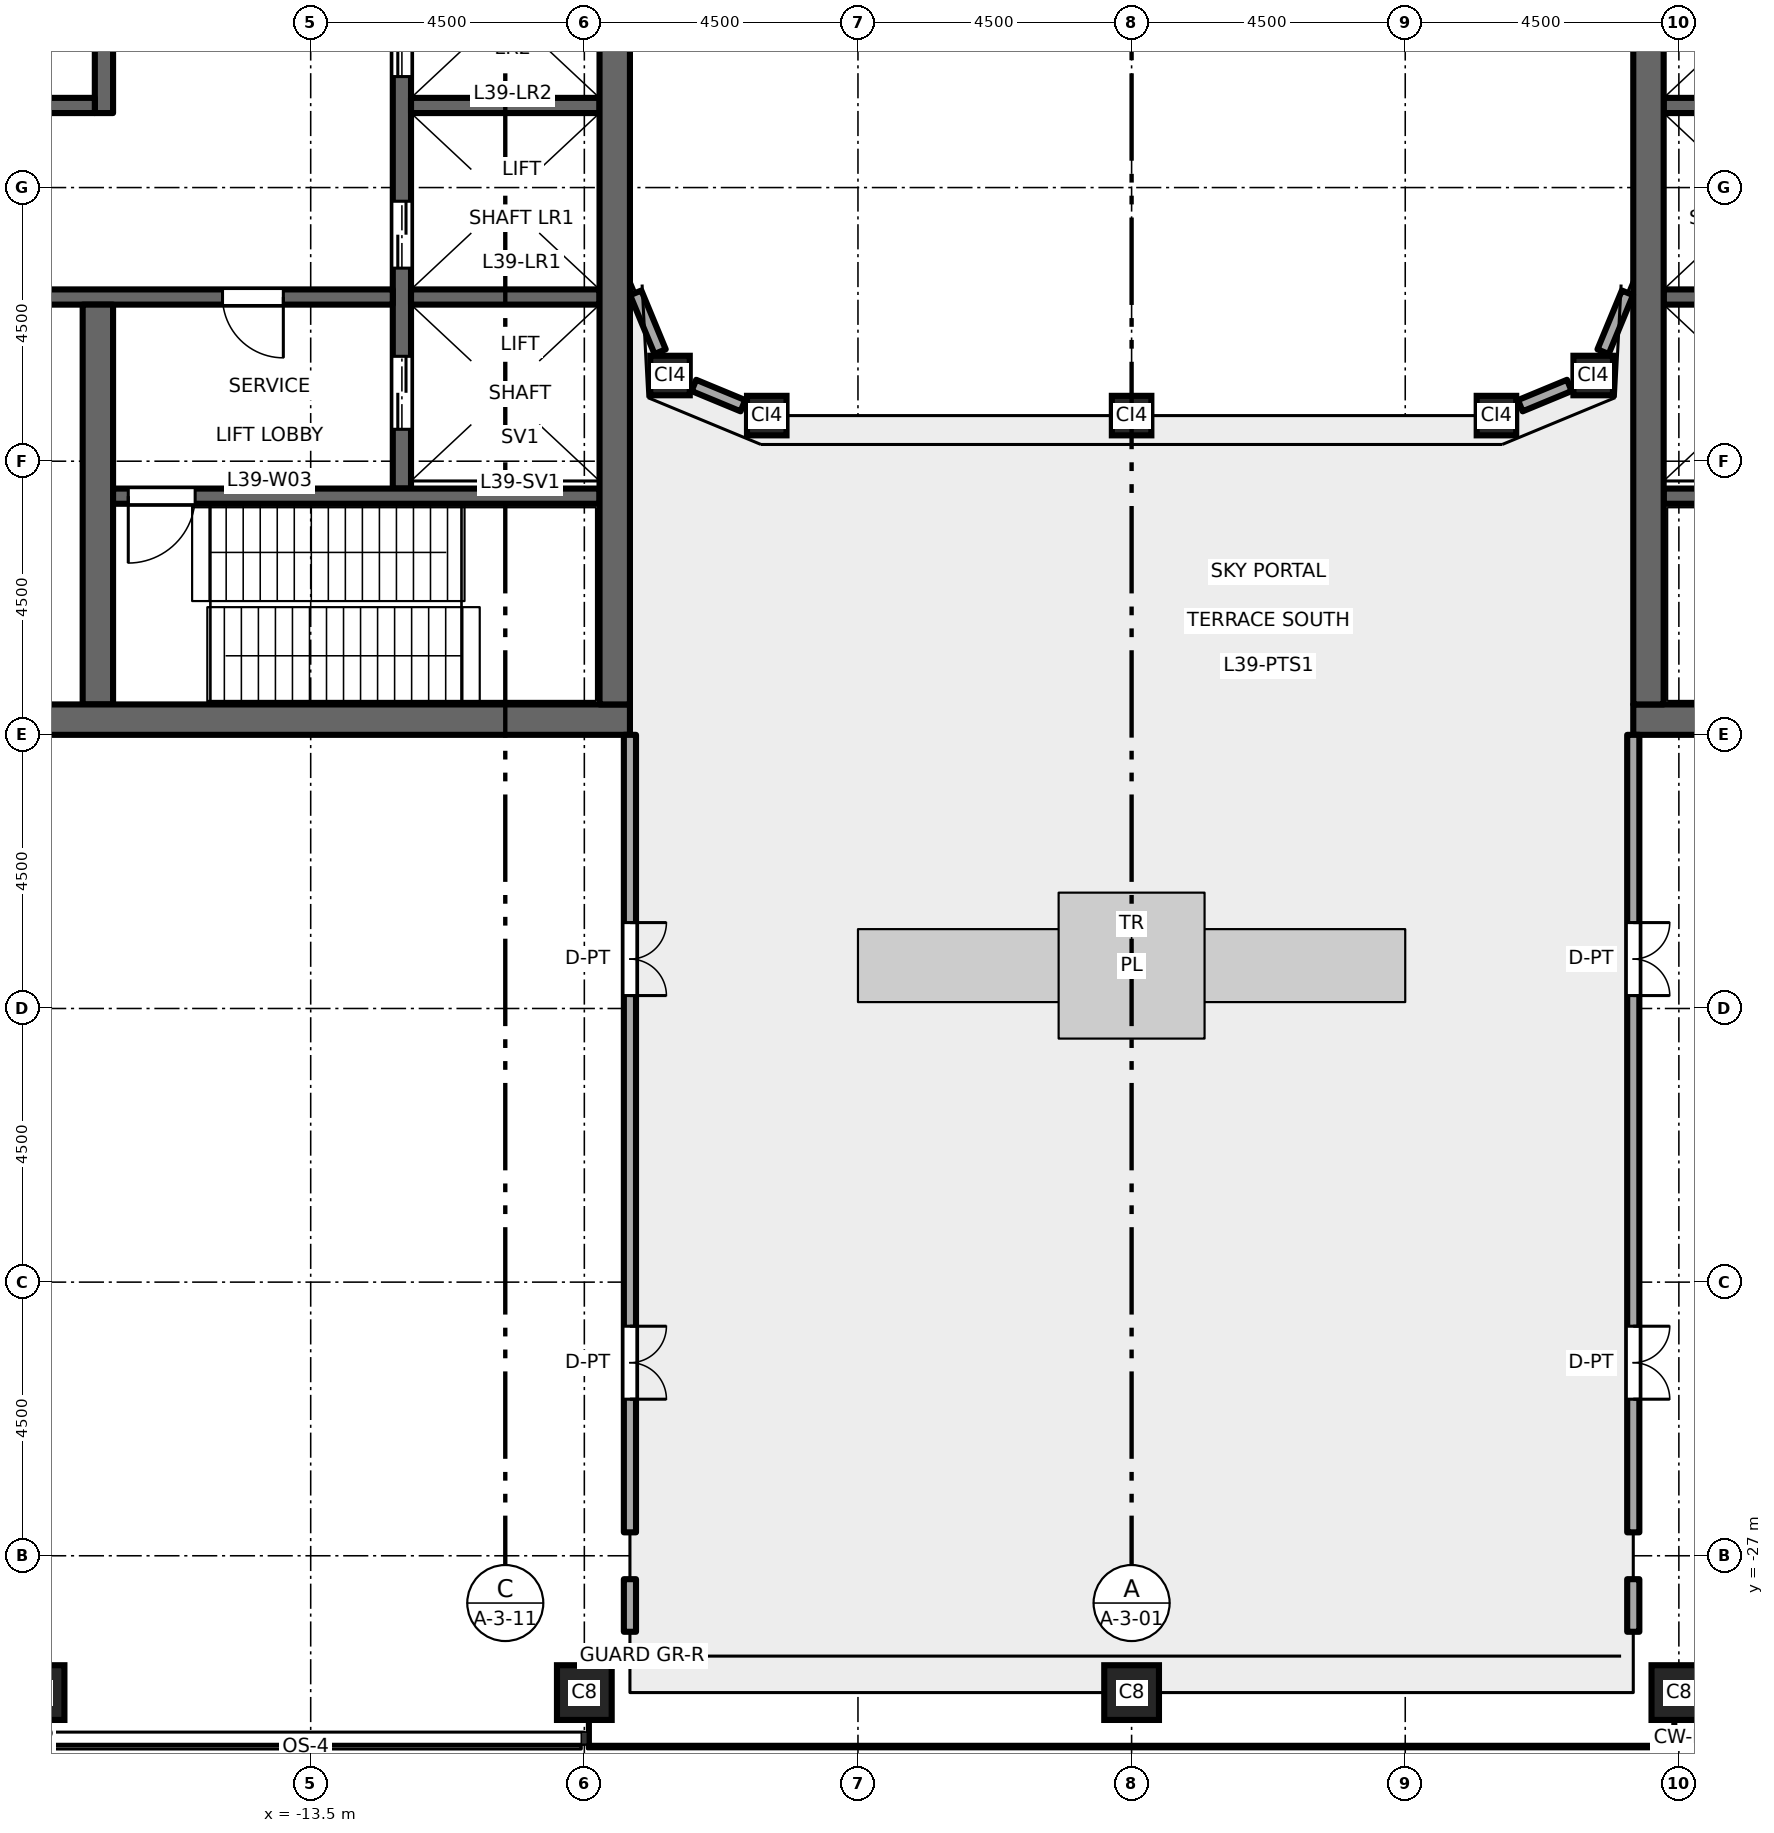
"""IFC4 building model, lengths in metres.
Left out: names, types, materials, properties, quantities, classifications, styles, units other than length and angle.
Written with IfcOpenShell. Run it as: python <this file> out.ifc"""

import sys

from ifc_helpers import new_model, si_unit, direction, frame, frame_2d, origin, origin_2d, place, context, subcontext, project, spatial, rectangle, hollow_rectangle, extrude, element, fill, save


model = new_model("IFC4")
c1 = context("Model", 3, precision=1e-05, world=origin(), true_north=direction((0.0, 1.0)))
c2 = subcontext(c1, "Body", "Model", "MODEL_VIEW")
j1 = project(units=[si_unit("LENGTHUNIT", "METRE"), si_unit("PLANEANGLEUNIT", "RADIAN")], contexts=[c1])
p1 = place(None, origin())
s1 = spatial("IfcSite", under=j1, at=p1, CompositionType="ELEMENT")
p2 = place(p1, origin())
s2 = spatial("IfcBuilding", under=s1, at=p2, CompositionType="ELEMENT")
p3 = place(p2, frame((0.0, 0.0, 181.2)))
s3 = spatial("IfcBuildingStorey", under=s2, at=p3, CompositionType="ELEMENT", Elevation=181.2)
for number, where, z_axis, x_axis in (
    (1, (-18.0, -29.25, 0.0), (0.0, 0.0, 1.0), (1.0, 0.0, 0.0)),
    (2, (-9.0, -29.25, 0.0), (0.0, 0.0, 1.0), (1.0, 0.0, 0.0)),
    (3, (0.0, -29.25, 0.0), (0.0, 0.0, 1.0), (1.0, 0.0, 0.0)),
    (4, (9.0, -29.25, 0.0), (0.0, 0.0, 1.0), (1.0, 0.0, 0.0)),
):
    element("IfcColumn", number, at=place(p3, frame(where, z_axis=z_axis, x_axis=x_axis)), inside=s3, PredefinedType="COLUMN", context=c2, shape_type="SweptSolid", body=[
        extrude(hollow_rectangle(XDim=0.9, YDim=0.9, WallThickness=0.05, at=origin_2d()), origin(), (0.0, 0.0, 1.0), 6.0),
    ])
for number, where, z_axis, x_axis in (
    (5, (-7.591, -7.591, 0.0), (0.0, 0.0, 1.0), (1.0, 0.0, 0.0)),
    (6, (-6.0, -8.25, 0.0), (0.0, 0.0, 1.0), (1.0, 0.0, 0.0)),
    (7, (0.0, -8.25, 0.0), (0.0, 0.0, 1.0), (1.0, 0.0, 0.0)),
    (8, (6.0, -8.25, 0.0), (0.0, 0.0, 1.0), (1.0, 0.0, 0.0)),
    (9, (7.591, -7.591, 0.0), (0.0, 0.0, 1.0), (1.0, 0.0, 0.0)),
):
    element("IfcColumn", number, at=place(p3, frame(where, z_axis=z_axis, x_axis=x_axis)), inside=s3, PredefinedType="COLUMN", context=c2, shape_type="SweptSolid", body=[
        extrude(hollow_rectangle(XDim=0.65, YDim=0.65, WallThickness=0.036, at=origin_2d()), origin(), (0.0, 0.0, 1.0), 6.0),
    ])
p4 = place(p3, frame((-12.0, -9.45, 0.0), z_axis=(0.0, 0.0, 1.0), x_axis=(0.0, 1.0, 0.0)))
e10 = element("IfcWall", 10, at=p4, inside=s3, PredefinedType="SHEAR", context=c2, shape_type="SweptSolid", body=[
    extrude(rectangle(XDim=18.9, YDim=0.3, at=frame_2d((9.45, 0.0))), origin(), (0.0, 0.0, 1.0), 5.8),
])
p5 = place(p4, frame((3.625, 0.0, 0.0)))
e11 = element("IfcOpeningElement", 11, at=p5, cuts=e10, PredefinedType="OPENING", context=c2, shape_type="SweptSolid", body=[
    extrude(rectangle(XDim=1.1, YDim=2.1, at=frame_2d((0.55, 1.05))), frame((0.0, 0.16, 0.0), z_axis=(0.0, -1.0, 0.0), x_axis=(1.0, 0.0, 0.0)), (0.0, 0.0, 1.0), 0.32),
])
p6 = place(p4, frame((6.775, 0.0, 0.0)))
e12 = element("IfcOpeningElement", 12, at=p6, cuts=e10, PredefinedType="OPENING", context=c2, shape_type="SweptSolid", body=[
    extrude(rectangle(XDim=1.1, YDim=2.1, at=frame_2d((0.55, 1.05))), frame((0.0, 0.16, 0.0), z_axis=(0.0, -1.0, 0.0), x_axis=(1.0, 0.0, 0.0)), (0.0, 0.0, 1.0), 0.32),
])
p7 = place(p4, frame((9.925, 0.0, 0.0)))
e13 = element("IfcOpeningElement", 13, at=p7, cuts=e10, PredefinedType="OPENING", context=c2, shape_type="SweptSolid", body=[
    extrude(rectangle(XDim=1.1, YDim=2.1, at=frame_2d((0.55, 1.05))), frame((0.0, 0.16, 0.0), z_axis=(0.0, -1.0, 0.0), x_axis=(1.0, 0.0, 0.0)), (0.0, 0.0, 1.0), 0.32),
])
p8 = place(p4, frame((13.075, 0.0, 0.0)))
e14 = element("IfcOpeningElement", 14, at=p8, cuts=e10, PredefinedType="OPENING", context=c2, shape_type="SweptSolid", body=[
    extrude(rectangle(XDim=1.1, YDim=2.1, at=frame_2d((0.55, 1.05))), frame((0.0, 0.16, 0.0), z_axis=(0.0, -1.0, 0.0), x_axis=(1.0, 0.0, 0.0)), (0.0, 0.0, 1.0), 0.32),
])
p9 = place(p4, frame((16.725, 0.0, 0.0)))
e15 = element("IfcOpeningElement", 15, at=p9, cuts=e10, PredefinedType="OPENING", context=c2, shape_type="SweptSolid", body=[
    extrude(rectangle(XDim=1.2, YDim=2.1, at=frame_2d((0.6, 1.05))), frame((0.0, 0.16, 0.0), z_axis=(0.0, -1.0, 0.0), x_axis=(1.0, 0.0, 0.0)), (0.0, 0.0, 1.0), 0.32),
])
p10 = place(p4, frame((0.975, 0.0, 0.0)))
e16 = element("IfcOpeningElement", 16, at=p10, cuts=e10, PredefinedType="OPENING", context=c2, shape_type="SweptSolid", body=[
    extrude(rectangle(XDim=1.2, YDim=2.1, at=frame_2d((0.6, 1.05))), frame((0.0, 0.16, 0.0), z_axis=(0.0, -1.0, 0.0), x_axis=(1.0, 0.0, 0.0)), (0.0, 0.0, 1.0), 0.32),
])
p11 = place(p3, frame((-12.15, -6.3, 0.0), z_axis=(0.0, 0.0, 1.0), x_axis=(-1.0, 0.0, 0.0)))
e17 = element("IfcWall", 17, at=p11, inside=s3, PredefinedType="SHEAR", context=c2, shape_type="SweptSolid", body=[
    extrude(rectangle(XDim=9.1, YDim=0.25, at=frame_2d((4.55, 0.0))), origin(), (0.0, 0.0, 1.0), 5.8),
])
p12 = place(p11, frame((1.8, 0.0, 0.0)))
e18 = element("IfcOpeningElement", 18, at=p12, cuts=e17, PredefinedType="OPENING", context=c2, shape_type="SweptSolid", body=[
    extrude(rectangle(XDim=1.0, YDim=2.1, at=frame_2d((0.5, 1.05))), frame((0.0, 0.135, 0.0), z_axis=(0.0, -1.0, 0.0), x_axis=(1.0, 0.0, 0.0)), (0.0, 0.0, 1.0), 0.27),
])
p13 = place(p11, frame((6.65, 0.0, 0.0)))
e19 = element("IfcOpeningElement", 19, at=p13, cuts=e17, PredefinedType="OPENING", context=c2, shape_type="SweptSolid", body=[
    extrude(rectangle(XDim=0.9, YDim=2.1, at=frame_2d((0.45, 1.05))), frame((0.0, 0.135, 0.0), z_axis=(0.0, -1.0, 0.0), x_axis=(1.0, 0.0, 0.0)), (0.0, 0.0, 1.0), 0.27),
])
p14 = place(p3, frame((-16.9, -3.275, 0.0), z_axis=(0.0, 0.0, 1.0), x_axis=(0.0, 1.0, 0.0)))
e20 = element("IfcWall", 20, at=p14, inside=s3, PredefinedType="SHEAR", context=c2, shape_type="SweptSolid", body=[
    extrude(rectangle(XDim=6.55, YDim=0.3, at=frame_2d((3.275, 0.0))), origin(), (0.0, 0.0, 1.0), 5.8),
])
p15 = place(p3, frame((-17.05, -3.15, 0.0), z_axis=(0.0, 0.0, 1.0), x_axis=(-1.0, 0.0, 0.0)))
e21 = element("IfcWall", 21, at=p15, inside=s3, PredefinedType="SHEAR", context=c2, shape_type="SweptSolid", body=[
    extrude(rectangle(XDim=4.2, YDim=0.25, at=frame_2d((2.1, 0.0))), origin(), (0.0, 0.0, 1.0), 5.8),
])
p16 = place(p3, frame((-17.0, -13.0, 0.0), z_axis=(0.0, 0.0, 1.0), x_axis=(0.0, 1.0, 0.0)))
e22 = element("IfcWall", 22, at=p16, inside=s3, PredefinedType="SHEAR", context=c2, shape_type="SweptSolid", body=[
    extrude(rectangle(XDim=6.575, YDim=0.5, at=frame_2d((3.288, 0.0))), origin(), (0.0, 0.0, 1.0), 5.8),
])
for number, where, z_axis, x_axis in (
    (23, (-8.75, -3.15, 0.0), (0.0, 0.0, 1.0), (-1.0, 0.0, 0.0)),
    (24, (-8.75, -6.3, 0.0), (0.0, 0.0, 1.0), (-1.0, 0.0, 0.0)),
):
    element("IfcWall", number, at=place(p3, frame(where, z_axis=z_axis, x_axis=x_axis)), inside=s3, PredefinedType="SHEAR", context=c2, shape_type="SweptSolid", body=[
        extrude(rectangle(XDim=3.1, YDim=0.25, at=frame_2d((1.55, 0.0))), origin(), (0.0, 0.0, 1.0), 5.8),
    ])
p17 = place(p3, frame((-8.75, -9.575, 0.0), z_axis=(0.0, 0.0, 1.0), x_axis=(-1.0, 0.0, 0.0)))
e25 = element("IfcWall", 25, at=p17, inside=s3, PredefinedType="SHEAR", context=c2, shape_type="SweptSolid", body=[
    extrude(rectangle(XDim=8.0, YDim=0.25, at=frame_2d((4.0, 0.0))), origin(), (0.0, 0.0, 1.0), 5.8),
])
p18 = place(p17, frame((6.65, 0.0, 0.0)))
e26 = element("IfcOpeningElement", 26, at=p18, cuts=e25, PredefinedType="OPENING", context=c2, shape_type="SweptSolid", body=[
    extrude(rectangle(XDim=1.1, YDim=2.1, at=frame_2d((0.55, 1.05))), frame((0.0, 0.135, 0.0), z_axis=(0.0, -1.0, 0.0), x_axis=(1.0, 0.0, 0.0)), (0.0, 0.0, 1.0), 0.27),
])
p19 = place(p3, frame((-8.25, -13.25, 0.0), z_axis=(0.0, 0.0, 1.0), x_axis=(-1.0, 0.0, 0.0)))
e27 = element("IfcWall", 27, at=p19, inside=s3, PredefinedType="SHEAR", context=c2, shape_type="SweptSolid", body=[
    extrude(rectangle(XDim=13.5, YDim=0.5, at=frame_2d((6.75, 0.0))), origin(), (0.0, 0.0, 1.0), 5.8),
])
p20 = place(p3, frame((-8.5, -13.0, 0.0), z_axis=(0.0, 0.0, 1.0), x_axis=(0.0, 1.0, 0.0)))
e28 = element("IfcWall", 28, at=p20, inside=s3, PredefinedType="SHEAR", context=c2, shape_type="SweptSolid", body=[
    extrude(rectangle(XDim=26.0, YDim=0.5, at=frame_2d((13.0, 0.0))), origin(), (0.0, 0.0, 1.0), 5.8),
])
for number, where, z_axis, x_axis in (
    (29, (8.75, -3.15, 0.0), (0.0, 0.0, 1.0), (1.0, 0.0, 0.0)),
    (30, (8.75, -6.3, 0.0), (0.0, 0.0, 1.0), (1.0, 0.0, 0.0)),
):
    element("IfcWall", number, at=place(p3, frame(where, z_axis=z_axis, x_axis=x_axis)), inside=s3, PredefinedType="SHEAR", context=c2, shape_type="SweptSolid", body=[
        extrude(rectangle(XDim=3.1, YDim=0.25, at=frame_2d((1.55, 0.0))), origin(), (0.0, 0.0, 1.0), 5.8),
    ])
p21 = place(p3, frame((8.75, -9.575, 0.0), z_axis=(0.0, 0.0, 1.0), x_axis=(1.0, 0.0, 0.0)))
e31 = element("IfcWall", 31, at=p21, inside=s3, PredefinedType="SHEAR", context=c2, shape_type="SweptSolid", body=[
    extrude(rectangle(XDim=8.0, YDim=0.25, at=frame_2d((4.0, 0.0))), origin(), (0.0, 0.0, 1.0), 5.8),
])
p22 = place(p21, frame((6.65, 0.0, 0.0)))
e32 = element("IfcOpeningElement", 32, at=p22, cuts=e31, PredefinedType="OPENING", context=c2, shape_type="SweptSolid", body=[
    extrude(rectangle(XDim=1.1, YDim=2.1, at=frame_2d((0.55, 1.05))), frame((0.0, 0.135, 0.0), z_axis=(0.0, -1.0, 0.0), x_axis=(1.0, 0.0, 0.0)), (0.0, 0.0, 1.0), 0.27),
])
p23 = place(p3, frame((8.25, -13.25, 0.0), z_axis=(0.0, 0.0, 1.0), x_axis=(1.0, 0.0, 0.0)))
e33 = element("IfcWall", 33, at=p23, inside=s3, PredefinedType="SHEAR", context=c2, shape_type="SweptSolid", body=[
    extrude(rectangle(XDim=13.5, YDim=0.5, at=frame_2d((6.75, 0.0))), origin(), (0.0, 0.0, 1.0), 5.8),
])
p24 = place(p3, frame((8.5, -13.0, 0.0), z_axis=(0.0, 0.0, 1.0), x_axis=(0.0, 1.0, 0.0)))
e34 = element("IfcWall", 34, at=p24, inside=s3, PredefinedType="SHEAR", context=c2, shape_type="SweptSolid", body=[
    extrude(rectangle(XDim=26.0, YDim=0.5, at=frame_2d((13.0, 0.0))), origin(), (0.0, 0.0, 1.0), 5.8),
])
p25 = place(p3, frame((6.392, -8.087, 0.0), z_axis=(0.0, 0.0, 1.0), x_axis=(0.923894108428, 0.382648241093, 0.0)))
e35 = element("IfcWall", 35, at=p25, inside=s3, PredefinedType="STANDARD", context=c2, shape_type="SweptSolid", body=[
    extrude(rectangle(XDim=0.873, YDim=0.2, at=frame_2d((0.437, 0.0))), origin(), (0.0, 0.0, 1.0), 5.368),
])
for number, where, z_axis, x_axis in (
    (36, (7.753, -7.199, 0.0), (0.0, 0.0, 1.0), (0.383, 0.924, 0.0)),
    (37, (-8.154, -6.231, 0.0), (0.0, 0.0, 1.0), (0.383, -0.924, 0.0)),
):
    element("IfcWall", number, at=place(p3, frame(where, z_axis=z_axis, x_axis=x_axis)), inside=s3, PredefinedType="STANDARD", context=c2, shape_type="SweptSolid", body=[
        extrude(rectangle(XDim=1.048, YDim=0.2, at=frame_2d((0.524, 0.0))), origin(), (0.0, 0.0, 1.0), 5.368),
    ])
p26 = place(p3, frame((-7.199, -7.753, 0.0), z_axis=(0.0, 0.0, 1.0), x_axis=(0.923894108428, -0.382648241093, 0.0)))
e38 = element("IfcWall", 38, at=p26, inside=s3, PredefinedType="STANDARD", context=c2, shape_type="SweptSolid", body=[
    extrude(rectangle(XDim=0.873, YDim=0.2, at=frame_2d((0.437, 0.0))), origin(), (0.0, 0.0, 1.0), 5.368),
])
p27 = place(p3, frame((-8.25, -13.5, 0.0), z_axis=(0.0, 0.0, 1.0), x_axis=(0.0, -1.0, 0.0)))
e39 = element("IfcWall", 39, at=p27, inside=s3, PredefinedType="STANDARD", context=c2, shape_type="SweptSolid", body=[
    extrude(rectangle(XDim=13.115, YDim=0.2, at=frame_2d((6.558, 0.0))), origin(), (0.0, 0.0, 1.0), 5.8),
])
p28 = place(p27, frame((3.087, 0.0, 0.0)))
e40 = element("IfcOpeningElement", 40, at=p28, cuts=e39, PredefinedType="OPENING", context=c2, shape_type="SweptSolid", body=[
    extrude(rectangle(XDim=1.2, YDim=2.4, at=frame_2d((0.6, 1.2))), frame((0.0, 0.11, 0.0), z_axis=(0.0, -1.0, 0.0), x_axis=(1.0, 0.0, 0.0)), (0.0, 0.0, 1.0), 0.22),
])
p29 = place(p27, frame((9.725, 0.0, 0.0)))
e41 = element("IfcOpeningElement", 41, at=p29, cuts=e39, PredefinedType="OPENING", context=c2, shape_type="SweptSolid", body=[
    extrude(rectangle(XDim=1.2, YDim=2.4, at=frame_2d((0.6, 1.2))), frame((0.0, 0.11, 0.0), z_axis=(0.0, -1.0, 0.0), x_axis=(1.0, 0.0, 0.0)), (0.0, 0.0, 1.0), 0.22),
])
p30 = place(p3, frame((-8.25, -27.385, 0.0), z_axis=(0.0, 0.0, 1.0), x_axis=(0.0, -1.0, 0.0)))
e42 = element("IfcWall", 42, at=p30, inside=s3, PredefinedType="STANDARD", context=c2, shape_type="SweptSolid", body=[
    extrude(rectangle(XDim=0.865, YDim=0.2, at=frame_2d((0.433, 0.0))), origin(), (0.0, 0.0, 1.0), 5.8),
])
p31 = place(p3, frame((8.25, -13.5, 0.0), z_axis=(0.0, 0.0, 1.0), x_axis=(0.0, -1.0, 0.0)))
e43 = element("IfcWall", 43, at=p31, inside=s3, PredefinedType="STANDARD", context=c2, shape_type="SweptSolid", body=[
    extrude(rectangle(XDim=13.115, YDim=0.2, at=frame_2d((6.558, 0.0))), origin(), (0.0, 0.0, 1.0), 5.8),
])
p32 = place(p31, frame((3.087, 0.0, 0.0)))
e44 = element("IfcOpeningElement", 44, at=p32, cuts=e43, PredefinedType="OPENING", context=c2, shape_type="SweptSolid", body=[
    extrude(rectangle(XDim=1.2, YDim=2.4, at=frame_2d((0.6, 1.2))), frame((0.0, 0.11, 0.0), z_axis=(0.0, -1.0, 0.0), x_axis=(1.0, 0.0, 0.0)), (0.0, 0.0, 1.0), 0.22),
])
p33 = place(p31, frame((9.725, 0.0, 0.0)))
e45 = element("IfcOpeningElement", 45, at=p33, cuts=e43, PredefinedType="OPENING", context=c2, shape_type="SweptSolid", body=[
    extrude(rectangle(XDim=1.2, YDim=2.4, at=frame_2d((0.6, 1.2))), frame((0.0, 0.11, 0.0), z_axis=(0.0, -1.0, 0.0), x_axis=(1.0, 0.0, 0.0)), (0.0, 0.0, 1.0), 0.22),
])
p34 = place(p3, frame((8.25, -27.385, 0.0), z_axis=(0.0, 0.0, 1.0), x_axis=(0.0, -1.0, 0.0)))
e46 = element("IfcWall", 46, at=p34, inside=s3, PredefinedType="STANDARD", context=c2, shape_type="SweptSolid", body=[
    extrude(rectangle(XDim=0.865, YDim=0.2, at=frame_2d((0.433, 0.0))), origin(), (0.0, 0.0, 1.0), 5.8),
])
p35 = place(p12, origin())
e47 = element("IfcDoor", 47, at=p35, inside=s3, OperationType="SINGLE_SWING_RIGHT", PredefinedType="DOOR", context=c2, shape_type="SweptSolid", body=[
    extrude(rectangle(XDim=1.0, YDim=2.1, at=frame_2d((0.5, 1.05))), frame((0.0, 0.025, 0.0), z_axis=(0.0, -1.0, 0.0), x_axis=(1.0, 0.0, 0.0)), (0.0, 0.0, 1.0), 0.05),
])
fill(e18, e47)
p36 = place(p18, origin())
e48 = element("IfcDoor", 48, at=p36, inside=s3, OperationType="SINGLE_SWING_LEFT", PredefinedType="DOOR", context=c2, shape_type="SweptSolid", body=[
    extrude(rectangle(XDim=1.1, YDim=2.1, at=frame_2d((0.55, 1.05))), frame((0.0, 0.025, 0.0), z_axis=(0.0, -1.0, 0.0), x_axis=(1.0, 0.0, 0.0)), (0.0, 0.0, 1.0), 0.05),
])
fill(e26, e48)
p37 = place(p5, origin())
e49 = element("IfcDoor", 49, at=p37, inside=s3, OperationType="DOUBLE_DOOR_SLIDING", PredefinedType="DOOR", context=c2, shape_type="SweptSolid", body=[
    extrude(rectangle(XDim=1.1, YDim=2.1, at=frame_2d((0.55, 1.05))), frame((0.0, 0.025, 0.0), z_axis=(0.0, -1.0, 0.0), x_axis=(1.0, 0.0, 0.0)), (0.0, 0.0, 1.0), 0.05),
])
fill(e11, e49)
p38 = place(p6, origin())
e50 = element("IfcDoor", 50, at=p38, inside=s3, OperationType="DOUBLE_DOOR_SLIDING", PredefinedType="DOOR", context=c2, shape_type="SweptSolid", body=[
    extrude(rectangle(XDim=1.1, YDim=2.1, at=frame_2d((0.55, 1.05))), frame((0.0, 0.025, 0.0), z_axis=(0.0, -1.0, 0.0), x_axis=(1.0, 0.0, 0.0)), (0.0, 0.0, 1.0), 0.05),
])
fill(e12, e50)
p39 = place(p10, origin())
e51 = element("IfcDoor", 51, at=p39, inside=s3, OperationType="DOUBLE_DOOR_SLIDING", PredefinedType="DOOR", context=c2, shape_type="SweptSolid", body=[
    extrude(rectangle(XDim=1.2, YDim=2.1, at=frame_2d((0.6, 1.05))), frame((0.0, 0.025, 0.0), z_axis=(0.0, -1.0, 0.0), x_axis=(1.0, 0.0, 0.0)), (0.0, 0.0, 1.0), 0.05),
])
fill(e16, e51)
p40 = place(p28, origin())
e52 = element("IfcDoor", 52, at=p40, inside=s3, OperationType="DOUBLE_DOOR_SINGLE_SWING", PredefinedType="DOOR", context=c2, shape_type="SweptSolid", body=[
    extrude(rectangle(XDim=1.2, YDim=2.4, at=frame_2d((0.6, 1.2))), frame((0.0, 0.025, 0.0), z_axis=(0.0, -1.0, 0.0), x_axis=(1.0, 0.0, 0.0)), (0.0, 0.0, 1.0), 0.05),
])
fill(e40, e52)
p41 = place(p29, origin())
e53 = element("IfcDoor", 53, at=p41, inside=s3, OperationType="DOUBLE_DOOR_SINGLE_SWING", PredefinedType="DOOR", context=c2, shape_type="SweptSolid", body=[
    extrude(rectangle(XDim=1.2, YDim=2.4, at=frame_2d((0.6, 1.2))), frame((0.0, 0.025, 0.0), z_axis=(0.0, -1.0, 0.0), x_axis=(1.0, 0.0, 0.0)), (0.0, 0.0, 1.0), 0.05),
])
fill(e41, e53)
p42 = place(p32, origin())
e54 = element("IfcDoor", 54, at=p42, inside=s3, OperationType="DOUBLE_DOOR_SINGLE_SWING", PredefinedType="DOOR", context=c2, shape_type="SweptSolid", body=[
    extrude(rectangle(XDim=1.2, YDim=2.4, at=frame_2d((0.6, 1.2))), frame((0.0, 0.025, 0.0), z_axis=(0.0, -1.0, 0.0), x_axis=(1.0, 0.0, 0.0)), (0.0, 0.0, 1.0), 0.05),
])
fill(e44, e54)
p43 = place(p33, origin())
e55 = element("IfcDoor", 55, at=p43, inside=s3, OperationType="DOUBLE_DOOR_SINGLE_SWING", PredefinedType="DOOR", context=c2, shape_type="SweptSolid", body=[
    extrude(rectangle(XDim=1.2, YDim=2.4, at=frame_2d((0.6, 1.2))), frame((0.0, 0.025, 0.0), z_axis=(0.0, -1.0, 0.0), x_axis=(1.0, 0.0, 0.0)), (0.0, 0.0, 1.0), 0.05),
])
fill(e45, e55)
save(model, sys.argv[1])
